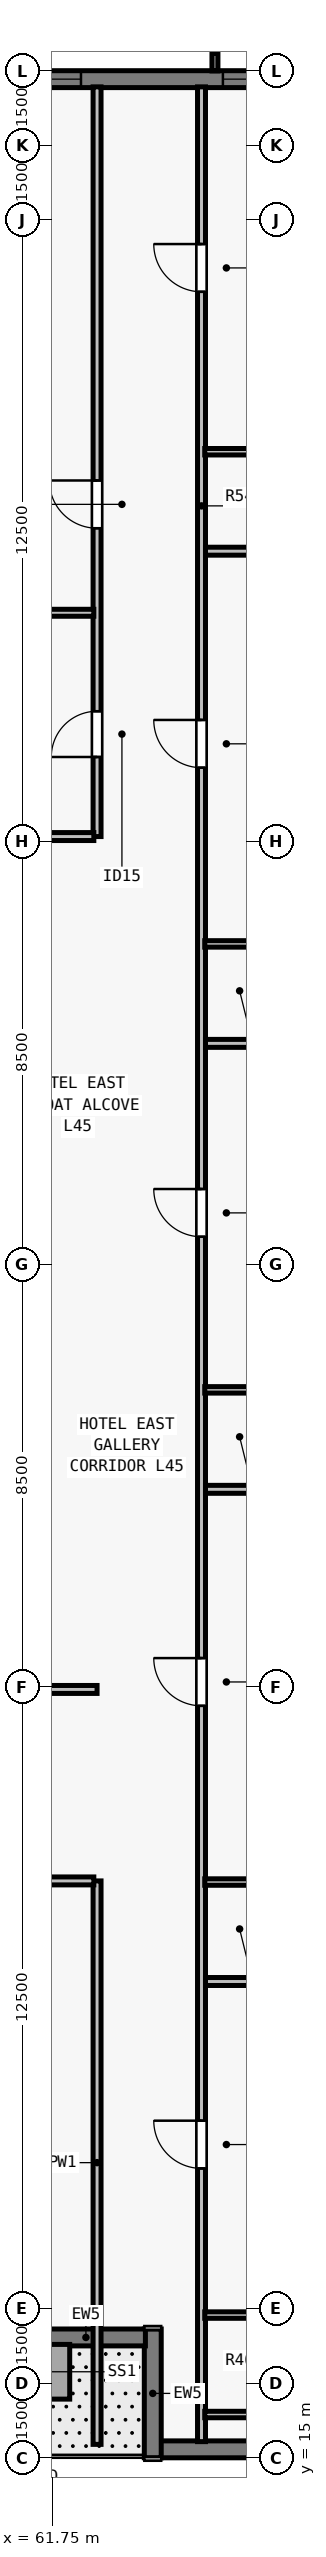
"""IFC4 building model, lengths in metres.
Left out: names, types, materials, properties, quantities, classifications, styles, units other than length and angle.
Written with IfcOpenShell. Run it as: python <this file> out.ifc"""

import sys

from ifc_helpers import new_model, si_unit, direction, frame, frame_2d, origin, place, context, subcontext, project, spatial, rectangle, extrude, element, fill, save


model = new_model("IFC4")
c1 = context("Model", 3, precision=1e-05, world=origin(), true_north=direction((0.0, 1.0)))
c2 = subcontext(c1, "Body", "Model", "MODEL_VIEW")
j1 = project(units=[si_unit("LENGTHUNIT", "METRE"), si_unit("PLANEANGLEUNIT", "RADIAN")], contexts=[c1])
p1 = place(None, origin())
s1 = spatial("IfcSite", under=j1, at=p1, CompositionType="ELEMENT")
p2 = place(p1, origin())
s2 = spatial("IfcBuilding", under=s1, at=p2, CompositionType="ELEMENT")
p3 = place(p2, frame((0.0, 0.0, 165.5)))
s3 = spatial("IfcBuildingStorey", under=s2, at=p3, CompositionType="ELEMENT", Elevation=165.5)
p4 = place(p3, frame((32.0, 62.83, 0.0), z_axis=(0.0, 0.0, 1.0), x_axis=(1.0, 0.0, 0.0)))
e1 = element("IfcWall", 1, at=p4, inside=s3, PredefinedType="SOLIDWALL", context=c2, shape_type="SweptSolid", body=[
    extrude(rectangle(XDim=39.682, YDim=0.34, at=frame_2d((19.841, 0.0))), origin(), (0.0, 0.0, 1.0), 3.28),
])
p5 = place(p4, frame((3.902, 0.0, 0.8)))
e2 = element("IfcOpeningElement", 2, at=p5, cuts=e1, PredefinedType="OPENING", context=c2, shape_type="SweptSolid", body=[
    extrude(rectangle(XDim=1.75, YDim=1.66, at=frame_2d((0.875, 0.83))), frame((0.0, 0.18, 0.0), z_axis=(0.0, -1.0, 0.0), x_axis=(1.0, 0.0, 0.0)), (0.0, 0.0, 1.0), 0.36),
])
p6 = place(p4, frame((8.955, 0.0, 0.8)))
e3 = element("IfcOpeningElement", 3, at=p6, cuts=e1, PredefinedType="OPENING", context=c2, shape_type="SweptSolid", body=[
    extrude(rectangle(XDim=1.35, YDim=1.66, at=frame_2d((0.675, 0.83))), frame((0.0, 0.18, 0.0), z_axis=(0.0, -1.0, 0.0), x_axis=(1.0, 0.0, 0.0)), (0.0, 0.0, 1.0), 0.36),
])
p7 = place(p4, frame((11.859, 0.0, 0.8)))
e4 = element("IfcOpeningElement", 4, at=p7, cuts=e1, PredefinedType="OPENING", context=c2, shape_type="SweptSolid", body=[
    extrude(rectangle(XDim=1.75, YDim=1.66, at=frame_2d((0.875, 0.83))), frame((0.0, 0.18, 0.0), z_axis=(0.0, -1.0, 0.0), x_axis=(1.0, 0.0, 0.0)), (0.0, 0.0, 1.0), 0.36),
])
p8 = place(p4, frame((16.062, 0.0, 0.8)))
e5 = element("IfcOpeningElement", 5, at=p8, cuts=e1, PredefinedType="OPENING", context=c2, shape_type="SweptSolid", body=[
    extrude(rectangle(XDim=1.35, YDim=1.66, at=frame_2d((0.675, 0.83))), frame((0.0, 0.18, 0.0), z_axis=(0.0, -1.0, 0.0), x_axis=(1.0, 0.0, 0.0)), (0.0, 0.0, 1.0), 0.36),
])
p9 = place(p4, frame((18.966, 0.0, 0.8)))
e6 = element("IfcOpeningElement", 6, at=p9, cuts=e1, PredefinedType="OPENING", context=c2, shape_type="SweptSolid", body=[
    extrude(rectangle(XDim=1.75, YDim=1.66, at=frame_2d((0.875, 0.83))), frame((0.0, 0.18, 0.0), z_axis=(0.0, -1.0, 0.0), x_axis=(1.0, 0.0, 0.0)), (0.0, 0.0, 1.0), 0.36),
])
p10 = place(p4, frame((22.719, 0.0, 0.8)))
e7 = element("IfcOpeningElement", 7, at=p10, cuts=e1, PredefinedType="OPENING", context=c2, shape_type="SweptSolid", body=[
    extrude(rectangle(XDim=1.35, YDim=1.66, at=frame_2d((0.675, 0.83))), frame((0.0, 0.18, 0.0), z_axis=(0.0, -1.0, 0.0), x_axis=(1.0, 0.0, 0.0)), (0.0, 0.0, 1.0), 0.36),
])
p11 = place(p4, frame((26.073, 0.0, 0.8)))
e8 = element("IfcOpeningElement", 8, at=p11, cuts=e1, PredefinedType="OPENING", context=c2, shape_type="SweptSolid", body=[
    extrude(rectangle(XDim=1.75, YDim=1.66, at=frame_2d((0.875, 0.83))), frame((0.0, 0.18, 0.0), z_axis=(0.0, -1.0, 0.0), x_axis=(1.0, 0.0, 0.0)), (0.0, 0.0, 1.0), 0.36),
])
p12 = place(p4, frame((28.977, 0.0, 0.8)))
e9 = element("IfcOpeningElement", 9, at=p12, cuts=e1, PredefinedType="OPENING", context=c2, shape_type="SweptSolid", body=[
    extrude(rectangle(XDim=1.35, YDim=1.66, at=frame_2d((0.675, 0.83))), frame((0.0, 0.18, 0.0), z_axis=(0.0, -1.0, 0.0), x_axis=(1.0, 0.0, 0.0)), (0.0, 0.0, 1.0), 0.36),
])
p13 = place(p4, frame((33.18, 0.0, 0.8)))
e10 = element("IfcOpeningElement", 10, at=p13, cuts=e1, PredefinedType="OPENING", context=c2, shape_type="SweptSolid", body=[
    extrude(rectangle(XDim=1.75, YDim=1.66, at=frame_2d((0.875, 0.83))), frame((0.0, 0.18, 0.0), z_axis=(0.0, -1.0, 0.0), x_axis=(1.0, 0.0, 0.0)), (0.0, 0.0, 1.0), 0.36),
])
p14 = place(p3, frame((72.0, 15.17, 0.0), z_axis=(0.0, 0.0, 1.0), x_axis=(-1.0, 0.0, 0.0)))
e11 = element("IfcWall", 11, at=p14, inside=s3, PredefinedType="SOLIDWALL", context=c2, shape_type="SweptSolid", body=[
    extrude(rectangle(XDim=8.082, YDim=0.34, at=frame_2d((4.041, 0.0))), origin(), (0.0, 0.0, 1.0), 3.28),
])
p15 = place(p3, frame((63.77, 15.0, 0.0), z_axis=(0.0, 0.0, 1.0), x_axis=(0.0, 1.0, 0.0)))
e12 = element("IfcWall", 12, at=p15, inside=s3, PredefinedType="SOLIDWALL", context=c2, shape_type="SweptSolid", body=[
    extrude(rectangle(XDim=2.59, YDim=0.34, at=frame_2d((1.295, 0.0))), origin(), (0.0, 0.0, 1.0), 3.28),
])
p16 = place(p3, frame((63.622, 17.42, 0.0), z_axis=(0.0, 0.0, 1.0), x_axis=(-1.0, 0.0, 0.0)))
e13 = element("IfcWall", 13, at=p16, inside=s3, PredefinedType="SOLIDWALL", context=c2, shape_type="SweptSolid", body=[
    extrude(rectangle(XDim=5.762, YDim=0.34, at=frame_2d((2.881, 0.0))), origin(), (0.0, 0.0, 1.0), 3.28),
])
p17 = place(p16, frame((2.542, 0.0, 0.0)))
e14 = element("IfcOpeningElement", 14, at=p17, cuts=e13, PredefinedType="OPENING", context=c2, shape_type="SweptSolid", body=[
    extrude(rectangle(XDim=1.0, YDim=2.15, at=frame_2d((0.5, 1.075))), frame((0.0, 0.18, 0.0), z_axis=(0.0, -1.0, 0.0), x_axis=(1.0, 0.0, 0.0)), (0.0, 0.0, 1.0), 0.36),
])
p18 = place(p3, frame((64.75, 15.325, 0.0), z_axis=(0.0, 0.0, 1.0), x_axis=(0.0, 1.0, 0.0)))
e15 = element("IfcWall", 15, at=p18, inside=s3, PredefinedType="PARTITIONING", context=c2, shape_type="SweptSolid", body=[
    extrude(rectangle(XDim=47.35, YDim=0.16, at=frame_2d((23.675, 0.0))), origin(), (0.0, 0.0, 1.0), 2.555),
])
p19 = place(p18, frame((5.494, 0.0, 0.0)))
e16 = element("IfcOpeningElement", 16, at=p19, cuts=e15, PredefinedType="OPENING", context=c2, shape_type="SweptSolid", body=[
    extrude(rectangle(XDim=0.96, YDim=2.15, at=frame_2d((0.48, 1.075))), frame((0.0, 0.09, 0.0), z_axis=(0.0, -1.0, 0.0), x_axis=(1.0, 0.0, 0.0)), (0.0, 0.0, 1.0), 0.18),
])
p20 = place(p18, frame((14.796, 0.0, 0.0)))
e17 = element("IfcOpeningElement", 17, at=p20, cuts=e15, PredefinedType="OPENING", context=c2, shape_type="SweptSolid", body=[
    extrude(rectangle(XDim=0.96, YDim=2.15, at=frame_2d((0.48, 1.075))), frame((0.0, 0.09, 0.0), z_axis=(0.0, -1.0, 0.0), x_axis=(1.0, 0.0, 0.0)), (0.0, 0.0, 1.0), 0.18),
])
p21 = place(p18, frame((24.228, 0.0, 0.0)))
e18 = element("IfcOpeningElement", 18, at=p21, cuts=e15, PredefinedType="OPENING", context=c2, shape_type="SweptSolid", body=[
    extrude(rectangle(XDim=0.96, YDim=2.15, at=frame_2d((0.48, 1.075))), frame((0.0, 0.09, 0.0), z_axis=(0.0, -1.0, 0.0), x_axis=(1.0, 0.0, 0.0)), (0.0, 0.0, 1.0), 0.18),
])
p22 = place(p18, frame((33.66, 0.0, 0.0)))
e19 = element("IfcOpeningElement", 19, at=p22, cuts=e15, PredefinedType="OPENING", context=c2, shape_type="SweptSolid", body=[
    extrude(rectangle(XDim=0.96, YDim=2.15, at=frame_2d((0.48, 1.075))), frame((0.0, 0.09, 0.0), z_axis=(0.0, -1.0, 0.0), x_axis=(1.0, 0.0, 0.0)), (0.0, 0.0, 1.0), 0.18),
])
p23 = place(p18, frame((43.229, 0.0, 0.0)))
e20 = element("IfcOpeningElement", 20, at=p23, cuts=e15, PredefinedType="OPENING", context=c2, shape_type="SweptSolid", body=[
    extrude(rectangle(XDim=0.96, YDim=2.15, at=frame_2d((0.48, 1.075))), frame((0.0, 0.09, 0.0), z_axis=(0.0, -1.0, 0.0), x_axis=(1.0, 0.0, 0.0)), (0.0, 0.0, 1.0), 0.18),
])
p24 = place(p3, frame((62.65, 15.27, 0.0), z_axis=(0.0, 0.0, 1.0), x_axis=(0.0, 1.0, 0.0)))
e21 = element("IfcWall", 21, at=p24, inside=s3, PredefinedType="PARTITIONING", context=c2, shape_type="SweptSolid", body=[
    extrude(rectangle(XDim=11.33, YDim=0.16, at=frame_2d((5.665, 0.0))), origin(), (0.0, 0.0, 1.0), 3.28),
])
p25 = place(p3, frame((62.65, 47.6, 0.0), z_axis=(0.0, 0.0, 1.0), x_axis=(0.0, 1.0, 0.0)))
e22 = element("IfcWall", 22, at=p25, inside=s3, PredefinedType="PARTITIONING", context=c2, shape_type="SweptSolid", body=[
    extrude(rectangle(XDim=15.075, YDim=0.16, at=frame_2d((7.538, 0.0))), origin(), (0.0, 0.0, 1.0), 2.555),
])
p26 = place(p25, frame((1.6, 0.0, 0.0)))
e23 = element("IfcOpeningElement", 23, at=p26, cuts=e22, PredefinedType="OPENING", context=c2, shape_type="SweptSolid", body=[
    extrude(rectangle(XDim=0.92, YDim=2.12, at=frame_2d((0.46, 1.06))), frame((0.0, 0.09, 0.0), z_axis=(0.0, -1.0, 0.0), x_axis=(1.0, 0.0, 0.0)), (0.0, 0.0, 1.0), 0.18),
])
p27 = place(p25, frame((6.2, 0.0, 0.0)))
e24 = element("IfcOpeningElement", 24, at=p27, cuts=e22, PredefinedType="OPENING", context=c2, shape_type="SweptSolid", body=[
    extrude(rectangle(XDim=0.96, YDim=2.12, at=frame_2d((0.48, 1.06))), frame((0.0, 0.09, 0.0), z_axis=(0.0, -1.0, 0.0), x_axis=(1.0, 0.0, 0.0)), (0.0, 0.0, 1.0), 0.18),
])
p28 = place(p3, frame((60.765, 30.45, 0.0), z_axis=(0.0, 0.0, 1.0), x_axis=(1.0, 0.0, 0.0)))
e25 = element("IfcWall", 25, at=p28, inside=s3, PredefinedType="PARTITIONING", context=c2, shape_type="SweptSolid", body=[
    extrude(rectangle(XDim=1.885, YDim=0.16, at=frame_2d((0.942, 0.0))), origin(), (0.0, 0.0, 1.0), 3.28),
])
p29 = place(p3, frame((60.765, 47.6, 0.0), z_axis=(0.0, 0.0, 1.0), x_axis=(1.0, 0.0, 0.0)))
e26 = element("IfcWall", 26, at=p29, inside=s3, PredefinedType="PARTITIONING", context=c2, shape_type="SweptSolid", body=[
    extrude(rectangle(XDim=1.82, YDim=0.16, at=frame_2d((0.91, 0.0))), origin(), (0.0, 0.0, 1.0), 3.28),
])
p30 = place(p3, frame((40.515, 26.6, 0.0), z_axis=(0.0, 0.0, 1.0), x_axis=(1.0, 0.0, 0.0)))
e27 = element("IfcWall", 27, at=p30, inside=s3, PredefinedType="PARTITIONING", context=c2, shape_type="SweptSolid", body=[
    extrude(rectangle(XDim=22.07, YDim=0.16, at=frame_2d((11.035, 0.0))), origin(), (0.0, 0.0, 1.0), 3.28),
])
p31 = place(p30, frame((3.072, 0.0, 0.0)))
e28 = element("IfcOpeningElement", 28, at=p31, cuts=e27, PredefinedType="OPENING", context=c2, shape_type="SweptSolid", body=[
    extrude(rectangle(XDim=0.96, YDim=2.15, at=frame_2d((0.48, 1.075))), frame((0.0, 0.09, 0.0), z_axis=(0.0, -1.0, 0.0), x_axis=(1.0, 0.0, 0.0)), (0.0, 0.0, 1.0), 0.18),
])
p32 = place(p30, frame((5.362, 0.0, 0.0)))
e29 = element("IfcOpeningElement", 29, at=p32, cuts=e27, PredefinedType="OPENING", context=c2, shape_type="SweptSolid", body=[
    extrude(rectangle(XDim=0.96, YDim=2.15, at=frame_2d((0.48, 1.075))), frame((0.0, 0.09, 0.0), z_axis=(0.0, -1.0, 0.0), x_axis=(1.0, 0.0, 0.0)), (0.0, 0.0, 1.0), 0.18),
])
p33 = place(p30, frame((11.566, 0.0, 0.0)))
e30 = element("IfcOpeningElement", 30, at=p33, cuts=e27, PredefinedType="OPENING", context=c2, shape_type="SweptSolid", body=[
    extrude(rectangle(XDim=0.96, YDim=2.15, at=frame_2d((0.48, 1.075))), frame((0.0, 0.09, 0.0), z_axis=(0.0, -1.0, 0.0), x_axis=(1.0, 0.0, 0.0)), (0.0, 0.0, 1.0), 0.18),
])
p34 = place(p30, frame((14.178, 0.0, 0.0)))
e31 = element("IfcOpeningElement", 31, at=p34, cuts=e27, PredefinedType="OPENING", context=c2, shape_type="SweptSolid", body=[
    extrude(rectangle(XDim=0.96, YDim=2.15, at=frame_2d((0.48, 1.075))), frame((0.0, 0.09, 0.0), z_axis=(0.0, -1.0, 0.0), x_axis=(1.0, 0.0, 0.0)), (0.0, 0.0, 1.0), 0.18),
])
p35 = place(p30, frame((20.099, 0.0, 0.0)))
e32 = element("IfcOpeningElement", 32, at=p35, cuts=e27, PredefinedType="OPENING", context=c2, shape_type="SweptSolid", body=[
    extrude(rectangle(XDim=0.96, YDim=2.15, at=frame_2d((0.48, 1.075))), frame((0.0, 0.09, 0.0), z_axis=(0.0, -1.0, 0.0), x_axis=(1.0, 0.0, 0.0)), (0.0, 0.0, 1.0), 0.18),
])
p36 = place(p3, frame((53.555, 52.1, 0.0), z_axis=(0.0, 0.0, 1.0), x_axis=(1.0, 0.0, 0.0)))
e33 = element("IfcWall", 33, at=p36, inside=s3, PredefinedType="PARTITIONING", context=c2, shape_type="SweptSolid", body=[
    extrude(rectangle(XDim=9.03, YDim=0.14, at=frame_2d((4.515, 0.0))), origin(), (0.0, 0.0, 1.0), 3.28),
])
for number, where, z_axis, x_axis in (
    (34, (64.815, 15.87, 0.0), (0.0, 0.0, 1.0), (1.0, 0.0, 0.0)),
    (35, (64.815, 17.87, 0.0), (0.0, 0.0, 1.0), (1.0, 0.0, 0.0)),
):
    element("IfcWall", number, at=place(p3, frame(where, z_axis=z_axis, x_axis=x_axis)), inside=s3, PredefinedType="PLUMBINGWALL", context=c2, shape_type="SweptSolid", body=[
        extrude(rectangle(XDim=2.315, YDim=0.13, at=frame_2d((1.157, 0.0))), origin(), (0.0, 0.0, 1.0), 3.28),
    ])
p37 = place(p3, frame((64.83, 24.577, 0.0), z_axis=(0.0, 0.0, 1.0), x_axis=(1.0, 0.0, 0.0)))
e36 = element("IfcWall", 36, at=p37, inside=s3, PredefinedType="PARTITIONING", context=c2, shape_type="SweptSolid", body=[
    extrude(rectangle(XDim=10.845, YDim=0.16, at=frame_2d((5.422, 0.0))), origin(), (0.0, 0.0, 1.0), 2.896),
])
p38 = place(p3, frame((64.815, 26.577, 0.0), z_axis=(0.0, 0.0, 1.0), x_axis=(1.0, 0.0, 0.0)))
e37 = element("IfcWall", 37, at=p38, inside=s3, PredefinedType="PLUMBINGWALL", context=c2, shape_type="SweptSolid", body=[
    extrude(rectangle(XDim=2.315, YDim=0.13, at=frame_2d((1.157, 0.0))), origin(), (0.0, 0.0, 1.0), 2.896),
])
p39 = place(p3, frame((64.83, 34.474, 0.0), z_axis=(0.0, 0.0, 1.0), x_axis=(1.0, 0.0, 0.0)))
e38 = element("IfcWall", 38, at=p39, inside=s3, PredefinedType="PARTITIONING", context=c2, shape_type="SweptSolid", body=[
    extrude(rectangle(XDim=10.845, YDim=0.16, at=frame_2d((5.422, 0.0))), origin(), (0.0, 0.0, 1.0), 3.28),
])
p40 = place(p3, frame((64.815, 36.474, 0.0), z_axis=(0.0, 0.0, 1.0), x_axis=(1.0, 0.0, 0.0)))
e39 = element("IfcWall", 39, at=p40, inside=s3, PredefinedType="PLUMBINGWALL", context=c2, shape_type="SweptSolid", body=[
    extrude(rectangle(XDim=2.315, YDim=0.13, at=frame_2d((1.157, 0.0))), origin(), (0.0, 0.0, 1.0), 3.28),
])
p41 = place(p3, frame((64.83, 43.441, 0.0), z_axis=(0.0, 0.0, 1.0), x_axis=(1.0, 0.0, 0.0)))
e40 = element("IfcWall", 40, at=p41, inside=s3, PredefinedType="PARTITIONING", context=c2, shape_type="SweptSolid", body=[
    extrude(rectangle(XDim=10.845, YDim=0.16, at=frame_2d((5.422, 0.0))), origin(), (0.0, 0.0, 1.0), 3.28),
])
p42 = place(p3, frame((64.815, 45.441, 0.0), z_axis=(0.0, 0.0, 1.0), x_axis=(1.0, 0.0, 0.0)))
e41 = element("IfcWall", 41, at=p42, inside=s3, PredefinedType="PLUMBINGWALL", context=c2, shape_type="SweptSolid", body=[
    extrude(rectangle(XDim=2.315, YDim=0.13, at=frame_2d((1.157, 0.0))), origin(), (0.0, 0.0, 1.0), 3.28),
])
p43 = place(p3, frame((64.83, 53.338, 0.0), z_axis=(0.0, 0.0, 1.0), x_axis=(1.0, 0.0, 0.0)))
e42 = element("IfcWall", 42, at=p43, inside=s3, PredefinedType="PARTITIONING", context=c2, shape_type="SweptSolid", body=[
    extrude(rectangle(XDim=10.845, YDim=0.16, at=frame_2d((5.422, 0.0))), origin(), (0.0, 0.0, 1.0), 2.896),
])
p44 = place(p3, frame((64.815, 55.338, 0.0), z_axis=(0.0, 0.0, 1.0), x_axis=(1.0, 0.0, 0.0)))
e43 = element("IfcWall", 43, at=p44, inside=s3, PredefinedType="PLUMBINGWALL", context=c2, shape_type="SweptSolid", body=[
    extrude(rectangle(XDim=2.315, YDim=0.13, at=frame_2d((1.157, 0.0))), origin(), (0.0, 0.0, 1.0), 3.28),
])
p45 = place(p12, origin())
e44 = element("IfcWindow", 44, at=p45, inside=s3, PartitioningType="SINGLE_PANEL", PredefinedType="WINDOW", context=c2, shape_type="SweptSolid", body=[
    extrude(rectangle(XDim=1.35, YDim=1.66, at=frame_2d((0.675, 0.83))), frame((0.0, -0.05, 0.0), z_axis=(0.0, -1.0, 0.0), x_axis=(1.0, 0.0, 0.0)), (0.0, 0.0, 1.0), 0.06),
])
fill(e9, e44)
p46 = place(p13, origin())
e45 = element("IfcWindow", 45, at=p46, inside=s3, PartitioningType="SINGLE_PANEL", PredefinedType="WINDOW", context=c2, shape_type="SweptSolid", body=[
    extrude(rectangle(XDim=1.75, YDim=1.66, at=frame_2d((0.875, 0.83))), frame((0.0, -0.05, 0.0), z_axis=(0.0, -1.0, 0.0), x_axis=(1.0, 0.0, 0.0)), (0.0, 0.0, 1.0), 0.06),
])
fill(e10, e45)
p47 = place(p26, origin())
e46 = element("IfcDoor", 46, at=p47, inside=s3, OperationType="SINGLE_SWING_LEFT", PredefinedType="DOOR", context=c2, shape_type="SweptSolid", body=[
    extrude(rectangle(XDim=0.92, YDim=2.12, at=frame_2d((0.46, 1.06))), frame((0.0, 0.025, 0.0), z_axis=(0.0, -1.0, 0.0), x_axis=(1.0, 0.0, 0.0)), (0.0, 0.0, 1.0), 0.05),
])
fill(e23, e46)
p48 = place(p27, origin())
e47 = element("IfcDoor", 47, at=p48, inside=s3, OperationType="SINGLE_SWING_RIGHT", PredefinedType="DOOR", context=c2, shape_type="SweptSolid", body=[
    extrude(rectangle(XDim=0.96, YDim=2.12, at=frame_2d((0.48, 1.06))), frame((0.0, 0.025, 0.0), z_axis=(0.0, -1.0, 0.0), x_axis=(1.0, 0.0, 0.0)), (0.0, 0.0, 1.0), 0.05),
])
fill(e24, e47)
p49 = place(p19, origin())
e48 = element("IfcDoor", 48, at=p49, inside=s3, OperationType="SINGLE_SWING_RIGHT", PredefinedType="DOOR", context=c2, shape_type="SweptSolid", body=[
    extrude(rectangle(XDim=0.96, YDim=2.15, at=frame_2d((0.48, 1.075))), frame((0.0, 0.025, 0.0), z_axis=(0.0, -1.0, 0.0), x_axis=(1.0, 0.0, 0.0)), (0.0, 0.0, 1.0), 0.05),
])
fill(e16, e48)
p50 = place(p20, origin())
e49 = element("IfcDoor", 49, at=p50, inside=s3, OperationType="SINGLE_SWING_RIGHT", PredefinedType="DOOR", context=c2, shape_type="SweptSolid", body=[
    extrude(rectangle(XDim=0.96, YDim=2.15, at=frame_2d((0.48, 1.075))), frame((0.0, 0.025, 0.0), z_axis=(0.0, -1.0, 0.0), x_axis=(1.0, 0.0, 0.0)), (0.0, 0.0, 1.0), 0.05),
])
fill(e17, e49)
p51 = place(p21, origin())
e50 = element("IfcDoor", 50, at=p51, inside=s3, OperationType="SINGLE_SWING_RIGHT", PredefinedType="DOOR", context=c2, shape_type="SweptSolid", body=[
    extrude(rectangle(XDim=0.96, YDim=2.15, at=frame_2d((0.48, 1.075))), frame((0.0, 0.025, 0.0), z_axis=(0.0, -1.0, 0.0), x_axis=(1.0, 0.0, 0.0)), (0.0, 0.0, 1.0), 0.05),
])
fill(e18, e50)
p52 = place(p22, origin())
e51 = element("IfcDoor", 51, at=p52, inside=s3, OperationType="SINGLE_SWING_RIGHT", PredefinedType="DOOR", context=c2, shape_type="SweptSolid", body=[
    extrude(rectangle(XDim=0.96, YDim=2.15, at=frame_2d((0.48, 1.075))), frame((0.0, 0.025, 0.0), z_axis=(0.0, -1.0, 0.0), x_axis=(1.0, 0.0, 0.0)), (0.0, 0.0, 1.0), 0.05),
])
fill(e19, e51)
p53 = place(p23, origin())
e52 = element("IfcDoor", 52, at=p53, inside=s3, OperationType="SINGLE_SWING_RIGHT", PredefinedType="DOOR", context=c2, shape_type="SweptSolid", body=[
    extrude(rectangle(XDim=0.96, YDim=2.15, at=frame_2d((0.48, 1.075))), frame((0.0, 0.025, 0.0), z_axis=(0.0, -1.0, 0.0), x_axis=(1.0, 0.0, 0.0)), (0.0, 0.0, 1.0), 0.05),
])
fill(e20, e52)
save(model, sys.argv[1])
